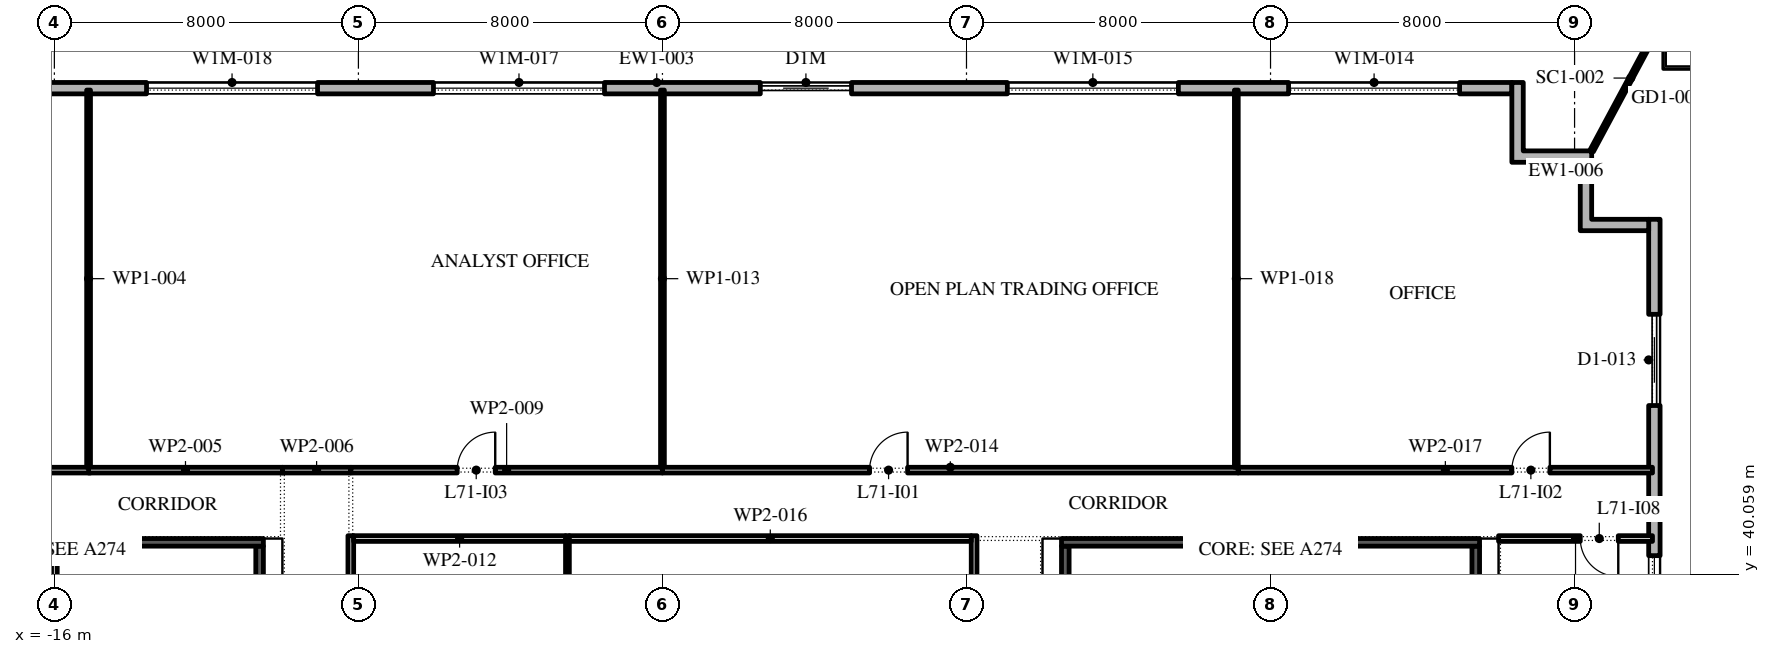
"""IFC4 building model, lengths in metres.
Left out: names, types, materials, properties, quantities, classifications, styles, units other than length and angle.
Written with IfcOpenShell. Run it as: python <this file> out.ifc"""

import sys

from ifc_helpers import new_model, si_unit, direction, frame, frame_2d, origin, place, context, subcontext, project, spatial, polyline, rectangle, outline, extrude, element, fill, save


model = new_model("IFC4")
c1 = context("Model", 3, precision=1e-05, world=origin(), true_north=direction((0.0, 1.0)))
c2 = subcontext(c1, "Body", "Model", "MODEL_VIEW")
j1 = project(units=[si_unit("LENGTHUNIT", "METRE"), si_unit("PLANEANGLEUNIT", "RADIAN")], contexts=[c1])
p1 = place(None, origin())
s1 = spatial("IfcSite", under=j1, at=p1, CompositionType="ELEMENT")
p2 = place(p1, origin())
s2 = spatial("IfcBuilding", under=s1, at=p2, CompositionType="ELEMENT")
p3 = place(p2, frame((0.0, 0.0, 325.8)))
s3 = spatial("IfcBuildingStorey", under=s2, at=p3, CompositionType="ELEMENT", Elevation=325.8)
p4 = place(p3, frame((26.1, -2.1, 0.0), z_axis=(0.0, 0.0, 1.0), x_axis=(0.0, 1.0, 0.0)))
e1 = element("IfcWall", 1, at=p4, inside=s3, PredefinedType="STANDARD", context=c2, shape_type="SweptSolid", body=[
    extrude(rectangle(XDim=51.5, YDim=0.3, at=frame_2d((25.75, 0.0))), origin(), (0.0, 0.0, 1.0), 4.0),
])
p5 = place(p4, frame((1.3, 0.0, 0.45)))
e2 = element("IfcOpeningElement", 2, at=p5, cuts=e1, PredefinedType="OPENING", context=c2, shape_type="SweptSolid", body=[
    extrude(rectangle(XDim=4.5, YDim=3.05, at=frame_2d((2.25, 1.525))), frame((0.0, 0.16, 0.0), z_axis=(0.0, -1.0, 0.0), x_axis=(1.0, 0.0, 0.0)), (0.0, 0.0, 1.0), 0.32),
])
p6 = place(p4, frame((8.55, 0.0, 0.45)))
e3 = element("IfcOpeningElement", 3, at=p6, cuts=e1, PredefinedType="OPENING", context=c2, shape_type="SweptSolid", body=[
    extrude(rectangle(XDim=4.5, YDim=3.05, at=frame_2d((2.25, 1.525))), frame((0.0, 0.16, 0.0), z_axis=(0.0, -1.0, 0.0), x_axis=(1.0, 0.0, 0.0)), (0.0, 0.0, 1.0), 0.32),
])
p7 = place(p4, frame((17.0, 0.0, 0.0)))
e4 = element("IfcOpeningElement", 4, at=p7, cuts=e1, PredefinedType="OPENING", context=c2, shape_type="SweptSolid", body=[
    extrude(rectangle(XDim=2.4, YDim=3.5, at=frame_2d((1.2, 1.75))), frame((0.0, 0.16, 0.0), z_axis=(0.0, -1.0, 0.0), x_axis=(1.0, 0.0, 0.0)), (0.0, 0.0, 1.0), 0.32),
])
p8 = place(p4, frame((23.35, 0.0, 0.45)))
e5 = element("IfcOpeningElement", 5, at=p8, cuts=e1, PredefinedType="OPENING", context=c2, shape_type="SweptSolid", body=[
    extrude(rectangle(XDim=4.5, YDim=3.05, at=frame_2d((2.25, 1.525))), frame((0.0, 0.16, 0.0), z_axis=(0.0, -1.0, 0.0), x_axis=(1.0, 0.0, 0.0)), (0.0, 0.0, 1.0), 0.32),
])
p9 = place(p4, frame((30.75, 0.0, 0.45)))
e6 = element("IfcOpeningElement", 6, at=p9, cuts=e1, PredefinedType="OPENING", context=c2, shape_type="SweptSolid", body=[
    extrude(rectangle(XDim=4.5, YDim=3.05, at=frame_2d((2.25, 1.525))), frame((0.0, 0.16, 0.0), z_axis=(0.0, -1.0, 0.0), x_axis=(1.0, 0.0, 0.0)), (0.0, 0.0, 1.0), 0.32),
])
p10 = place(p4, frame((38.15, 0.0, 0.45)))
e7 = element("IfcOpeningElement", 7, at=p10, cuts=e1, PredefinedType="OPENING", context=c2, shape_type="SweptSolid", body=[
    extrude(rectangle(XDim=4.5, YDim=3.05, at=frame_2d((2.25, 1.525))), frame((0.0, 0.16, 0.0), z_axis=(0.0, -1.0, 0.0), x_axis=(1.0, 0.0, 0.0)), (0.0, 0.0, 1.0), 0.32),
])
p11 = place(p4, frame((46.6, 0.0, 0.0)))
e8 = element("IfcOpeningElement", 8, at=p11, cuts=e1, PredefinedType="OPENING", context=c2, shape_type="SweptSolid", body=[
    extrude(rectangle(XDim=2.4, YDim=3.5, at=frame_2d((1.2, 1.75))), frame((0.0, 0.16, 0.0), z_axis=(0.0, -1.0, 0.0), x_axis=(1.0, 0.0, 0.0)), (0.0, 0.0, 1.0), 0.32),
])
p12 = place(p3, frame((22.35, 52.85, 0.0), z_axis=(0.0, 0.0, 1.0), x_axis=(-1.0, 0.0, 0.0)))
e9 = element("IfcWall", 9, at=p12, inside=s3, PredefinedType="STANDARD", context=c2, shape_type="SweptSolid", body=[
    extrude(rectangle(XDim=45.0, YDim=0.3, at=frame_2d((22.5, 0.0))), origin(), (0.0, 0.0, 1.0), 4.0),
])
p13 = place(p12, frame((1.375, 0.0, 0.45)))
e10 = element("IfcOpeningElement", 10, at=p13, cuts=e9, PredefinedType="OPENING", context=c2, shape_type="SweptSolid", body=[
    extrude(rectangle(XDim=4.5, YDim=2.575, at=frame_2d((2.25, 1.288))), frame((0.0, 0.16, 0.0), z_axis=(0.0, -1.0, 0.0), x_axis=(1.0, 0.0, 0.0)), (0.0, 0.0, 1.0), 0.32),
])
p14 = place(p12, frame((8.775, 0.0, 0.45)))
e11 = element("IfcOpeningElement", 11, at=p14, cuts=e9, PredefinedType="OPENING", context=c2, shape_type="SweptSolid", body=[
    extrude(rectangle(XDim=4.5, YDim=2.575, at=frame_2d((2.25, 1.288))), frame((0.0, 0.16, 0.0), z_axis=(0.0, -1.0, 0.0), x_axis=(1.0, 0.0, 0.0)), (0.0, 0.0, 1.0), 0.32),
])
p15 = place(p12, frame((17.375, 0.0, 0.0)))
e12 = element("IfcOpeningElement", 12, at=p15, cuts=e9, PredefinedType="OPENING", context=c2, shape_type="SweptSolid", body=[
    extrude(rectangle(XDim=2.4, YDim=3.025, at=frame_2d((1.2, 1.512))), frame((0.0, 0.16, 0.0), z_axis=(0.0, -1.0, 0.0), x_axis=(1.0, 0.0, 0.0)), (0.0, 0.0, 1.0), 0.32),
])
p16 = place(p12, frame((23.875, 0.0, 0.45)))
e13 = element("IfcOpeningElement", 13, at=p16, cuts=e9, PredefinedType="OPENING", context=c2, shape_type="SweptSolid", body=[
    extrude(rectangle(XDim=4.5, YDim=2.575, at=frame_2d((2.25, 1.288))), frame((0.0, 0.16, 0.0), z_axis=(0.0, -1.0, 0.0), x_axis=(1.0, 0.0, 0.0)), (0.0, 0.0, 1.0), 0.32),
])
p17 = place(p12, frame((31.425, 0.0, 0.45)))
e14 = element("IfcOpeningElement", 14, at=p17, cuts=e9, PredefinedType="OPENING", context=c2, shape_type="SweptSolid", body=[
    extrude(rectangle(XDim=4.5, YDim=2.575, at=frame_2d((2.25, 1.288))), frame((0.0, 0.16, 0.0), z_axis=(0.0, -1.0, 0.0), x_axis=(1.0, 0.0, 0.0)), (0.0, 0.0, 1.0), 0.32),
])
p18 = place(p12, frame((38.975, 0.0, 0.45)))
e15 = element("IfcOpeningElement", 15, at=p18, cuts=e9, PredefinedType="OPENING", context=c2, shape_type="SweptSolid", body=[
    extrude(rectangle(XDim=4.5, YDim=2.575, at=frame_2d((2.25, 1.288))), frame((0.0, 0.16, 0.0), z_axis=(0.0, -1.0, 0.0), x_axis=(1.0, 0.0, 0.0)), (0.0, 0.0, 1.0), 0.32),
])
p19 = place(p3, origin())
e16 = element("IfcWall", 16, at=p19, inside=s3, PredefinedType="STANDARD", context=c2, shape_type="SweptSolid", body=[
    extrude(outline(polyline([(24.15, 50.9), (22.35, 50.9), (22.35, 53.0), (22.65, 53.0), (22.65, 51.2), (24.45, 51.2), (24.45, 49.4), (25.95, 49.4), (25.95, 49.1), (24.15, 49.1), (24.15, 50.9)])), origin(), (0.0, 0.0, 1.0), 4.0),
])
p20 = place(p3, frame((24.45, 51.2, -0.05), z_axis=(0.0, 0.0, 1.0), x_axis=(0.472807073277, 0.881165972709, 0.0)))
e17 = element("IfcWall", 17, at=p20, inside=s3, PredefinedType="STANDARD", context=c2, shape_type="SweptSolid", body=[
    extrude(rectangle(XDim=4.349, YDim=0.1, at=frame_2d((2.174, 0.0))), origin(), (0.0, 0.0, 1.0), 4.05),
])
p21 = place(p3, frame((-10.6, 25.75, 0.0), z_axis=(0.0, 0.0, 1.0), x_axis=(0.0, 1.0, 0.0)))
e18 = element("IfcWall", 18, at=p21, inside=s3, PredefinedType="SHEAR", context=c2, shape_type="SweptSolid", body=[
    extrude(rectangle(XDim=15.05, YDim=0.2, at=frame_2d((7.525, 0.0))), origin(), (0.0, 0.0, 1.0), 4.0),
])
p22 = place(p21, frame((7.075, 0.0, 0.0)))
e19 = element("IfcOpeningElement", 19, at=p22, cuts=e18, PredefinedType="OPENING", context=c2, shape_type="SweptSolid", body=[
    extrude(rectangle(XDim=0.9, YDim=2.1, at=frame_2d((0.45, 1.05))), frame((0.0, 0.11, 0.0), z_axis=(0.0, -1.0, 0.0), x_axis=(1.0, 0.0, 0.0)), (0.0, 0.0, 1.0), 0.22),
])
p23 = place(p3, frame((-21.5, 40.9, 0.0), z_axis=(0.0, 0.0, 1.0), x_axis=(1.0, 0.0, 0.0)))
e20 = element("IfcWall", 20, at=p23, inside=s3, PredefinedType="SHEAR", context=c2, shape_type="SweptSolid", body=[
    extrude(rectangle(XDim=11.0, YDim=0.2, at=frame_2d((5.5, 0.0))), origin(), (0.0, 0.0, 1.0), 4.0),
])
p24 = place(p3, frame((-16.0, 25.75, 0.0), z_axis=(0.0, 0.0, 1.0), x_axis=(0.0, 1.0, 0.0)))
e21 = element("IfcWall", 21, at=p24, inside=s3, PredefinedType="PARTITIONING", context=c2, shape_type="SweptSolid", body=[
    extrude(rectangle(XDim=15.05, YDim=0.15, at=frame_2d((7.525, 0.0))), origin(), (0.0, 0.0, 1.0), 4.0),
])
p25 = place(p3, frame((21.4, 25.75, 0.0), z_axis=(0.0, 0.0, 1.0), x_axis=(0.0, 1.0, 0.0)))
e22 = element("IfcWall", 22, at=p25, inside=s3, PredefinedType="SHEAR", context=c2, shape_type="SweptSolid", body=[
    extrude(rectangle(XDim=15.05, YDim=0.2, at=frame_2d((7.525, 0.0))), origin(), (0.0, 0.0, 1.0), 4.0),
])
p26 = place(p3, frame((10.6, 25.75, 0.0), z_axis=(0.0, 0.0, 1.0), x_axis=(0.0, 1.0, 0.0)))
e23 = element("IfcWall", 23, at=p26, inside=s3, PredefinedType="SHEAR", context=c2, shape_type="SweptSolid", body=[
    extrude(rectangle(XDim=15.05, YDim=0.2, at=frame_2d((7.525, 0.0))), origin(), (0.0, 0.0, 1.0), 4.0),
])
p27 = place(p26, frame((7.075, 0.0, 0.0)))
e24 = element("IfcOpeningElement", 24, at=p27, cuts=e23, PredefinedType="OPENING", context=c2, shape_type="SweptSolid", body=[
    extrude(rectangle(XDim=0.9, YDim=2.1, at=frame_2d((0.45, 1.05))), frame((0.0, 0.11, 0.0), z_axis=(0.0, -1.0, 0.0), x_axis=(1.0, 0.0, 0.0)), (0.0, 0.0, 1.0), 0.22),
])
p28 = place(p3, frame((10.5, 40.9, 0.0), z_axis=(0.0, 0.0, 1.0), x_axis=(1.0, 0.0, 0.0)))
e25 = element("IfcWall", 25, at=p28, inside=s3, PredefinedType="SHEAR", context=c2, shape_type="SweptSolid", body=[
    extrude(rectangle(XDim=11.0, YDim=0.2, at=frame_2d((5.5, 0.0))), origin(), (0.0, 0.0, 1.0), 4.0),
])
p29 = place(p3, frame((-26.05, 42.8, 0.0), z_axis=(0.0, 0.0, 1.0), x_axis=(1.0, 0.0, 0.0)))
e26 = element("IfcWall", 26, at=p29, inside=s3, PredefinedType="PARTITIONING", context=c2, shape_type="SweptSolid", body=[
    extrude(rectangle(XDim=11.0, YDim=0.15, at=frame_2d((5.5, 0.0))), origin(), (0.0, 0.0, 1.0), 4.0),
])
p30 = place(p29, frame((2.55, 0.0, 0.0)))
e27 = element("IfcOpeningElement", 27, at=p30, cuts=e26, PredefinedType="OPENING", context=c2, shape_type="SweptSolid", body=[
    extrude(rectangle(XDim=1.0, YDim=2.1, at=frame_2d((0.5, 1.05))), frame((0.0, 0.085, 0.0), z_axis=(0.0, -1.0, 0.0), x_axis=(1.0, 0.0, 0.0)), (0.0, 0.0, 1.0), 0.17),
])
p31 = place(p3, frame((-15.1, 42.875, 0.0), z_axis=(0.0, 0.0, 1.0), x_axis=(0.0, 1.0, 0.0)))
e28 = element("IfcWall", 28, at=p31, inside=s3, PredefinedType="PARTITIONING", context=c2, shape_type="SweptSolid", body=[
    extrude(rectangle(XDim=9.925, YDim=0.1, at=frame_2d((4.962, 0.0))), origin(), (0.0, 0.0, 1.0), 4.0),
])
p32 = place(p3, frame((-15.1, 42.8, 0.0), z_axis=(0.0, 0.0, 1.0), x_axis=(1.0, 0.0, 0.0)))
e29 = element("IfcWall", 29, at=p32, inside=s3, PredefinedType="PARTITIONING", context=c2, shape_type="SweptSolid", body=[
    extrude(rectangle(XDim=5.1, YDim=0.15, at=frame_2d((2.55, 0.0))), origin(), (0.0, 0.0, 1.0), 4.0),
])
p33 = place(p3, frame((-10.0, 42.8, 0.0), z_axis=(0.0, 0.0, 1.0), x_axis=(1.0, 0.0, 0.0)))
e30 = element("IfcWall", 30, at=p33, inside=s3, PredefinedType="PARTITIONING", context=c2, shape_type="SweptSolid", body=[
    extrude(rectangle(XDim=1.8, YDim=0.15, at=frame_2d((0.9, 0.0))), origin(), (0.0, 0.0, 1.0), 4.0),
])
p34 = place(p3, frame((-8.2, 41.075, 0.0), z_axis=(0.0, 0.0, 1.0), x_axis=(0.0, -1.0, 0.0)))
e31 = element("IfcWall", 31, at=p34, inside=s3, PredefinedType="PARTITIONING", context=c2, shape_type="SweptSolid", body=[
    extrude(rectangle(XDim=22.0, YDim=0.15, at=frame_2d((11.0, 0.0))), origin(), (0.0, 0.0, 1.0), 4.0),
])
p35 = place(p34, frame((10.675, 0.0, 0.0)))
e32 = element("IfcOpeningElement", 32, at=p35, cuts=e31, PredefinedType="OPENING", context=c2, shape_type="SweptSolid", body=[
    extrude(rectangle(XDim=1.0, YDim=2.1, at=frame_2d((0.5, 1.05))), frame((0.0, 0.085, 0.0), z_axis=(0.0, -1.0, 0.0), x_axis=(1.0, 0.0, 0.0)), (0.0, 0.0, 1.0), 0.17),
])
p36 = place(p3, frame((-8.2, 42.8, 0.0), z_axis=(0.0, 0.0, 1.0), x_axis=(1.0, 0.0, 0.0)))
e33 = element("IfcWall", 33, at=p36, inside=s3, PredefinedType="PARTITIONING", context=c2, shape_type="SweptSolid", body=[
    extrude(rectangle(XDim=8.2, YDim=0.15, at=frame_2d((4.1, 0.0))), origin(), (0.0, 0.0, 1.0), 4.0),
])
p37 = place(p36, frame((2.8, 0.0, 0.0)))
e34 = element("IfcOpeningElement", 34, at=p37, cuts=e33, PredefinedType="OPENING", context=c2, shape_type="SweptSolid", body=[
    extrude(rectangle(XDim=1.0, YDim=2.1, at=frame_2d((0.5, 1.05))), frame((0.0, 0.085, 0.0), z_axis=(0.0, -1.0, 0.0), x_axis=(1.0, 0.0, 0.0)), (0.0, 0.0, 1.0), 0.17),
])
p38 = place(p3, frame((-2.5, 19.075, 0.0), z_axis=(0.0, 0.0, 1.0), x_axis=(0.0, 1.0, 0.0)))
e35 = element("IfcWall", 35, at=p38, inside=s3, PredefinedType="PARTITIONING", context=c2, shape_type="SweptSolid", body=[
    extrude(rectangle(XDim=22.0, YDim=0.1, at=frame_2d((11.0, 0.0))), origin(), (0.0, 0.0, 1.0), 4.0),
])
p39 = place(p3, frame((-2.55, 41.0, 0.0), z_axis=(0.0, 0.0, 1.0), x_axis=(-1.0, 0.0, 0.0)))
e36 = element("IfcWall", 36, at=p39, inside=s3, PredefinedType="PARTITIONING", context=c2, shape_type="SweptSolid", body=[
    extrude(rectangle(XDim=5.575, YDim=0.15, at=frame_2d((2.788, 0.0))), origin(), (0.0, 0.0, 1.0), 4.0),
])
p40 = place(p3, frame((0.0, 42.875, 0.0), z_axis=(0.0, 0.0, 1.0), x_axis=(0.0, 1.0, 0.0)))
e37 = element("IfcWall", 37, at=p40, inside=s3, PredefinedType="PARTITIONING", context=c2, shape_type="SweptSolid", body=[
    extrude(rectangle(XDim=9.925, YDim=0.1, at=frame_2d((4.962, 0.0))), origin(), (0.0, 0.0, 1.0), 4.0),
])
p41 = place(p3, frame((0.0, 42.8, 0.0), z_axis=(0.0, 0.0, 1.0), x_axis=(1.0, 0.0, 0.0)))
e38 = element("IfcWall", 38, at=p41, inside=s3, PredefinedType="PARTITIONING", context=c2, shape_type="SweptSolid", body=[
    extrude(rectangle(XDim=15.15, YDim=0.15, at=frame_2d((7.575, 0.0))), origin(), (0.0, 0.0, 1.0), 4.0),
])
p42 = place(p41, frame((5.45, 0.0, 0.0)))
e39 = element("IfcOpeningElement", 39, at=p42, cuts=e38, PredefinedType="OPENING", context=c2, shape_type="SweptSolid", body=[
    extrude(rectangle(XDim=1.0, YDim=2.1, at=frame_2d((0.5, 1.05))), frame((0.0, 0.085, 0.0), z_axis=(0.0, -1.0, 0.0), x_axis=(1.0, 0.0, 0.0)), (0.0, 0.0, 1.0), 0.17),
])
p43 = place(p3, frame((8.2, 19.075, 0.0), z_axis=(0.0, 0.0, 1.0), x_axis=(0.0, 1.0, 0.0)))
e40 = element("IfcWall", 40, at=p43, inside=s3, PredefinedType="PARTITIONING", context=c2, shape_type="SweptSolid", body=[
    extrude(rectangle(XDim=22.0, YDim=0.15, at=frame_2d((11.0, 0.0))), origin(), (0.0, 0.0, 1.0), 4.0),
])
p44 = place(p43, frame((7.725, 0.0, 0.0)))
e41 = element("IfcOpeningElement", 41, at=p44, cuts=e40, PredefinedType="OPENING", context=c2, shape_type="SweptSolid", body=[
    extrude(rectangle(XDim=1.8, YDim=2.1, at=frame_2d((0.9, 1.05))), frame((0.0, 0.085, 0.0), z_axis=(0.0, -1.0, 0.0), x_axis=(1.0, 0.0, 0.0)), (0.0, 0.0, 1.0), 0.17),
])
p45 = place(p3, frame((8.125, 41.0, 0.0), z_axis=(0.0, 0.0, 1.0), x_axis=(-1.0, 0.0, 0.0)))
e42 = element("IfcWall", 42, at=p45, inside=s3, PredefinedType="PARTITIONING", context=c2, shape_type="SweptSolid", body=[
    extrude(rectangle(XDim=10.575, YDim=0.15, at=frame_2d((5.288, 0.0))), origin(), (0.0, 0.0, 1.0), 4.0),
])
p46 = place(p3, frame((15.15, 42.8, 0.0), z_axis=(0.0, 0.0, 1.0), x_axis=(1.0, 0.0, 0.0)))
e43 = element("IfcWall", 43, at=p46, inside=s3, PredefinedType="PARTITIONING", context=c2, shape_type="SweptSolid", body=[
    extrude(rectangle(XDim=10.9, YDim=0.15, at=frame_2d((5.45, 0.0))), origin(), (0.0, 0.0, 1.0), 4.0),
])
p47 = place(p46, frame((7.2, 0.0, 0.0)))
e44 = element("IfcOpeningElement", 44, at=p47, cuts=e43, PredefinedType="OPENING", context=c2, shape_type="SweptSolid", body=[
    extrude(rectangle(XDim=1.0, YDim=2.1, at=frame_2d((0.5, 1.05))), frame((0.0, 0.085, 0.0), z_axis=(0.0, -1.0, 0.0), x_axis=(1.0, 0.0, 0.0)), (0.0, 0.0, 1.0), 0.17),
])
p48 = place(p3, frame((15.1, 52.8, 0.0), z_axis=(0.0, 0.0, 1.0), x_axis=(0.0, -1.0, 0.0)))
e45 = element("IfcWall", 45, at=p48, inside=s3, PredefinedType="PARTITIONING", context=c2, shape_type="SweptSolid", body=[
    extrude(rectangle(XDim=9.925, YDim=0.1, at=frame_2d((4.962, 0.0))), origin(), (0.0, 0.0, 1.0), 4.0),
])
p49 = place(p3, frame((26.05, 41.0, 0.0), z_axis=(0.0, 0.0, 1.0), x_axis=(-1.0, 0.0, 0.0)))
e46 = element("IfcWall", 46, at=p49, inside=s3, PredefinedType="PARTITIONING", context=c2, shape_type="SweptSolid", body=[
    extrude(rectangle(XDim=4.05, YDim=0.15, at=frame_2d((2.025, 0.0))), origin(), (0.0, 0.0, 1.0), 4.0),
])
p50 = place(p49, frame((0.9, 0.0, 0.0)))
e47 = element("IfcOpeningElement", 47, at=p50, cuts=e46, PredefinedType="OPENING", context=c2, shape_type="SweptSolid", body=[
    extrude(rectangle(XDim=1.0, YDim=2.1, at=frame_2d((0.5, 1.05))), frame((0.0, 0.085, 0.0), z_axis=(0.0, -1.0, 0.0), x_axis=(1.0, 0.0, 0.0)), (0.0, 0.0, 1.0), 0.17),
])
p51 = place(p10, origin())
e48 = element("IfcWindow", 48, at=p51, inside=s3, PartitioningType="DOUBLE_PANEL_VERTICAL", PredefinedType="WINDOW", context=c2, shape_type="SweptSolid", body=[
    extrude(rectangle(XDim=4.5, YDim=3.05, at=frame_2d((2.25, 1.525))), frame((0.0, 0.03, 0.0), z_axis=(0.0, -1.0, 0.0), x_axis=(1.0, 0.0, 0.0)), (0.0, 0.0, 1.0), 0.06),
])
fill(e7, e48)
p52 = place(p11, origin())
e49 = element("IfcDoor", 49, at=p52, inside=s3, OperationType="DOUBLE_DOOR_SLIDING", PredefinedType="DOOR", context=c2, shape_type="SweptSolid", body=[
    extrude(rectangle(XDim=2.4, YDim=3.5, at=frame_2d((1.2, 1.75))), frame((0.0, 0.025, 0.0), z_axis=(0.0, -1.0, 0.0), x_axis=(1.0, 0.0, 0.0)), (0.0, 0.0, 1.0), 0.05),
])
fill(e8, e49)
p53 = place(p13, origin())
e50 = element("IfcWindow", 50, at=p53, inside=s3, PartitioningType="DOUBLE_PANEL_VERTICAL", PredefinedType="WINDOW", context=c2, shape_type="SweptSolid", body=[
    extrude(rectangle(XDim=4.5, YDim=2.575, at=frame_2d((2.25, 1.288))), frame((0.0, 0.03, 0.0), z_axis=(0.0, -1.0, 0.0), x_axis=(1.0, 0.0, 0.0)), (0.0, 0.0, 1.0), 0.06),
])
fill(e10, e50)
p54 = place(p14, origin())
e51 = element("IfcWindow", 51, at=p54, inside=s3, PartitioningType="DOUBLE_PANEL_VERTICAL", PredefinedType="WINDOW", context=c2, shape_type="SweptSolid", body=[
    extrude(rectangle(XDim=4.5, YDim=2.575, at=frame_2d((2.25, 1.288))), frame((0.0, 0.03, 0.0), z_axis=(0.0, -1.0, 0.0), x_axis=(1.0, 0.0, 0.0)), (0.0, 0.0, 1.0), 0.06),
])
fill(e11, e51)
p55 = place(p15, origin())
e52 = element("IfcDoor", 52, at=p55, inside=s3, OperationType="DOUBLE_DOOR_SLIDING", PredefinedType="DOOR", context=c2, shape_type="SweptSolid", body=[
    extrude(rectangle(XDim=2.4, YDim=3.025, at=frame_2d((1.2, 1.512))), frame((0.0, 0.025, 0.0), z_axis=(0.0, -1.0, 0.0), x_axis=(1.0, 0.0, 0.0)), (0.0, 0.0, 1.0), 0.05),
])
fill(e12, e52)
p56 = place(p16, origin())
e53 = element("IfcWindow", 53, at=p56, inside=s3, PartitioningType="DOUBLE_PANEL_VERTICAL", PredefinedType="WINDOW", context=c2, shape_type="SweptSolid", body=[
    extrude(rectangle(XDim=4.5, YDim=2.575, at=frame_2d((2.25, 1.288))), frame((0.0, 0.03, 0.0), z_axis=(0.0, -1.0, 0.0), x_axis=(1.0, 0.0, 0.0)), (0.0, 0.0, 1.0), 0.06),
])
fill(e13, e53)
p57 = place(p17, origin())
e54 = element("IfcWindow", 54, at=p57, inside=s3, PartitioningType="DOUBLE_PANEL_VERTICAL", PredefinedType="WINDOW", context=c2, shape_type="SweptSolid", body=[
    extrude(rectangle(XDim=4.5, YDim=2.575, at=frame_2d((2.25, 1.288))), frame((0.0, 0.03, 0.0), z_axis=(0.0, -1.0, 0.0), x_axis=(1.0, 0.0, 0.0)), (0.0, 0.0, 1.0), 0.06),
])
fill(e14, e54)
p58 = place(p42, origin())
e55 = element("IfcDoor", 55, at=p58, inside=s3, OperationType="SINGLE_SWING_LEFT", PredefinedType="DOOR", context=c2, shape_type="SweptSolid", body=[
    extrude(rectangle(XDim=1.0, YDim=2.1, at=frame_2d((0.5, 1.05))), frame((0.0, 0.025, 0.0), z_axis=(0.0, -1.0, 0.0), x_axis=(1.0, 0.0, 0.0)), (0.0, 0.0, 1.0), 0.05),
])
fill(e39, e55)
p59 = place(p47, origin())
e56 = element("IfcDoor", 56, at=p59, inside=s3, OperationType="SINGLE_SWING_LEFT", PredefinedType="DOOR", context=c2, shape_type="SweptSolid", body=[
    extrude(rectangle(XDim=1.0, YDim=2.1, at=frame_2d((0.5, 1.05))), frame((0.0, 0.025, 0.0), z_axis=(0.0, -1.0, 0.0), x_axis=(1.0, 0.0, 0.0)), (0.0, 0.0, 1.0), 0.05),
])
fill(e44, e56)
p60 = place(p37, origin())
e57 = element("IfcDoor", 57, at=p60, inside=s3, OperationType="SINGLE_SWING_LEFT", PredefinedType="DOOR", context=c2, shape_type="SweptSolid", body=[
    extrude(rectangle(XDim=1.0, YDim=2.1, at=frame_2d((0.5, 1.05))), frame((0.0, 0.025, 0.0), z_axis=(0.0, -1.0, 0.0), x_axis=(1.0, 0.0, 0.0)), (0.0, 0.0, 1.0), 0.05),
])
fill(e34, e57)
p61 = place(p50, origin())
e58 = element("IfcDoor", 58, at=p61, inside=s3, OperationType="SINGLE_SWING_RIGHT", PredefinedType="DOOR", context=c2, shape_type="SweptSolid", body=[
    extrude(rectangle(XDim=1.0, YDim=2.1, at=frame_2d((0.5, 1.05))), frame((0.0, 0.025, 0.0), z_axis=(0.0, -1.0, 0.0), x_axis=(1.0, 0.0, 0.0)), (0.0, 0.0, 1.0), 0.05),
])
fill(e47, e58)
save(model, sys.argv[1])
